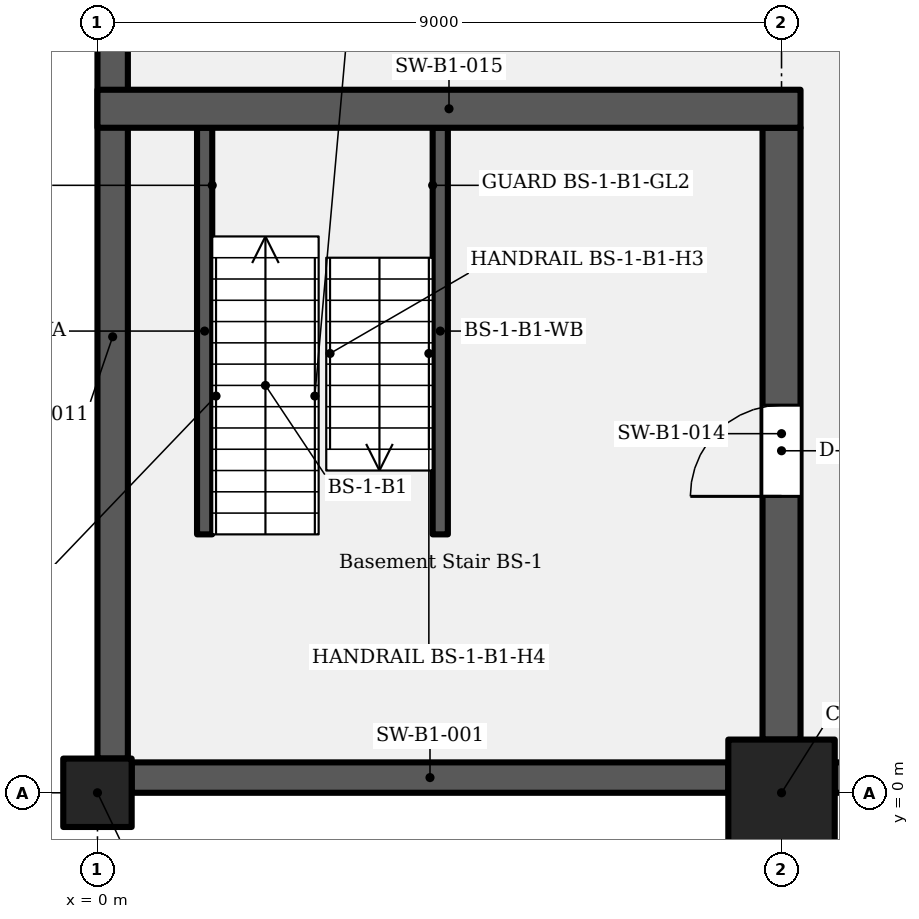
"""IFC4 building model, lengths in metres.
Left out: names, types, materials, properties, quantities, classifications, styles, units other than length and angle.
Written with IfcOpenShell. Run it as: python <this file> out.ifc"""

import sys

from ifc_helpers import new_model, si_unit, direction, frame, frame_2d, origin, origin_with_axes, origin_2d, place, context, subcontext, project, spatial, rectangle, extrude, element, fill, save


model = new_model("IFC4")
c1 = context("Model", 3, precision=1e-05, world=origin(), true_north=direction((0.0, 1.0)))
c2 = subcontext(c1, "Body", "Model", "MODEL_VIEW")
j1 = project(units=[si_unit("LENGTHUNIT", "METRE"), si_unit("PLANEANGLEUNIT", "RADIAN")], contexts=[c1])
p1 = place(None, origin())
s1 = spatial("IfcSite", under=j1, at=p1, CompositionType="ELEMENT")
p2 = place(p1, origin())
s2 = spatial("IfcBuilding", under=s1, at=p2, CompositionType="ELEMENT")
p3 = place(p2, frame((0.0, 0.0, -4.2)))
s3 = spatial("IfcBuildingStorey", under=s2, at=p3, CompositionType="ELEMENT", Elevation=-4.2)
p4 = place(p3, origin_with_axes())
e1 = element("IfcColumn", 1, at=p4, inside=s3, PredefinedType="COLUMN", context=c2, shape_type="SweptSolid", body=[
    extrude(rectangle(XDim=0.9, YDim=0.9, at=origin_2d()), origin(), (0.0, 0.0, 1.0), 4.2),
])
p5 = place(p3, frame((9.0, 0.0, 0.0), z_axis=(0.0, 0.0, 1.0), x_axis=(1.0, 0.0, 0.0)))
e2 = element("IfcColumn", 2, at=p5, inside=s3, PredefinedType="COLUMN", context=c2, shape_type="SweptSolid", body=[
    extrude(rectangle(XDim=1.4, YDim=1.4, at=origin_2d()), origin(), (0.0, 0.0, 1.0), 4.2),
])
p6 = place(p3, frame((0.45, 0.2, 0.0), z_axis=(0.0, 0.0, 1.0), x_axis=(1.0, 0.0, 0.0)))
e3 = element("IfcWall", 3, at=p6, inside=s3, PredefinedType="SOLIDWALL", context=c2, shape_type="SweptSolid", body=[
    extrude(rectangle(XDim=7.85, YDim=0.4, at=frame_2d((3.925, 0.0))), origin(), (0.0, 0.0, 1.0), 3.9),
])
p7 = place(p3, frame((9.7, 0.2, 0.0), z_axis=(0.0, 0.0, 1.0), x_axis=(1.0, 0.0, 0.0)))
e4 = element("IfcWall", 4, at=p7, inside=s3, PredefinedType="SOLIDWALL", context=c2, shape_type="SweptSolid", body=[
    extrude(rectangle(XDim=7.6, YDim=0.4, at=frame_2d((3.8, 0.0))), origin(), (0.0, 0.0, 1.0), 3.9),
])
p8 = place(p3, frame((0.2, 0.45, 0.0), z_axis=(0.0, 0.0, 1.0), x_axis=(0.0, 1.0, 0.0)))
e5 = element("IfcWall", 5, at=p8, inside=s3, PredefinedType="SOLIDWALL", context=c2, shape_type="SweptSolid", body=[
    extrude(rectangle(XDim=11.1, YDim=0.4, at=frame_2d((5.55, 0.0))), origin(), (0.0, 0.0, 1.0), 3.9),
])
p9 = place(p3, frame((9.0, 0.7, 0.0), z_axis=(0.0, 0.0, 1.0), x_axis=(0.0, 1.0, 0.0)))
e6 = element("IfcWall", 6, at=p9, inside=s3, PredefinedType="SHEAR", context=c2, shape_type="SweptSolid", body=[
    extrude(rectangle(XDim=8.05, YDim=0.5, at=frame_2d((4.025, 0.0))), origin(), (0.0, 0.0, 1.0), 3.9),
])
p10 = place(p9, frame((3.2, 0.0, 0.0)))
e7 = element("IfcOpeningElement", 7, at=p10, cuts=e6, PredefinedType="OPENING", context=c2, shape_type="SweptSolid", body=[
    extrude(rectangle(XDim=1.2, YDim=2.1, at=frame_2d((0.6, 1.05))), frame((0.0, 0.26, 0.0), z_axis=(0.0, -1.0, 0.0), x_axis=(1.0, 0.0, 0.0)), (0.0, 0.0, 1.0), 0.52),
])
p11 = place(p3, frame((0.0, 9.0, 0.0), z_axis=(0.0, 0.0, 1.0), x_axis=(1.0, 0.0, 0.0)))
e8 = element("IfcWall", 8, at=p11, inside=s3, PredefinedType="SHEAR", context=c2, shape_type="SweptSolid", body=[
    extrude(rectangle(XDim=9.25, YDim=0.5, at=frame_2d((4.625, 0.0))), origin(), (0.0, 0.0, 1.0), 3.9),
])
for number, where, z_axis, x_axis in (
    (9, (1.41, 3.4, 0.0), (0.0, 0.0, 1.0), (0.0, 1.0, 0.0)),
    (10, (4.51, 3.4, 0.0), (0.0, 0.0, 1.0), (0.0, 1.0, 0.0)),
):
    element("IfcWall", number, at=place(p3, frame(where, z_axis=z_axis, x_axis=x_axis)), inside=s3, PredefinedType="SHEAR", context=c2, shape_type="SweptSolid", body=[
        extrude(rectangle(XDim=5.35, YDim=0.2, at=frame_2d((2.675, 0.0))), origin(), (0.0, 0.0, 1.0), 3.9),
    ])
p12 = place(p10, origin())
e11 = element("IfcDoor", 11, at=p12, inside=s3, OperationType="SINGLE_SWING_LEFT", PredefinedType="DOOR", context=c2, shape_type="SweptSolid", body=[
    extrude(rectangle(XDim=1.2, YDim=2.1, at=frame_2d((0.6, 1.05))), frame((0.0, 0.025, 0.0), z_axis=(0.0, -1.0, 0.0), x_axis=(1.0, 0.0, 0.0)), (0.0, 0.0, 1.0), 0.05),
])
fill(e7, e11)
save(model, sys.argv[1])
